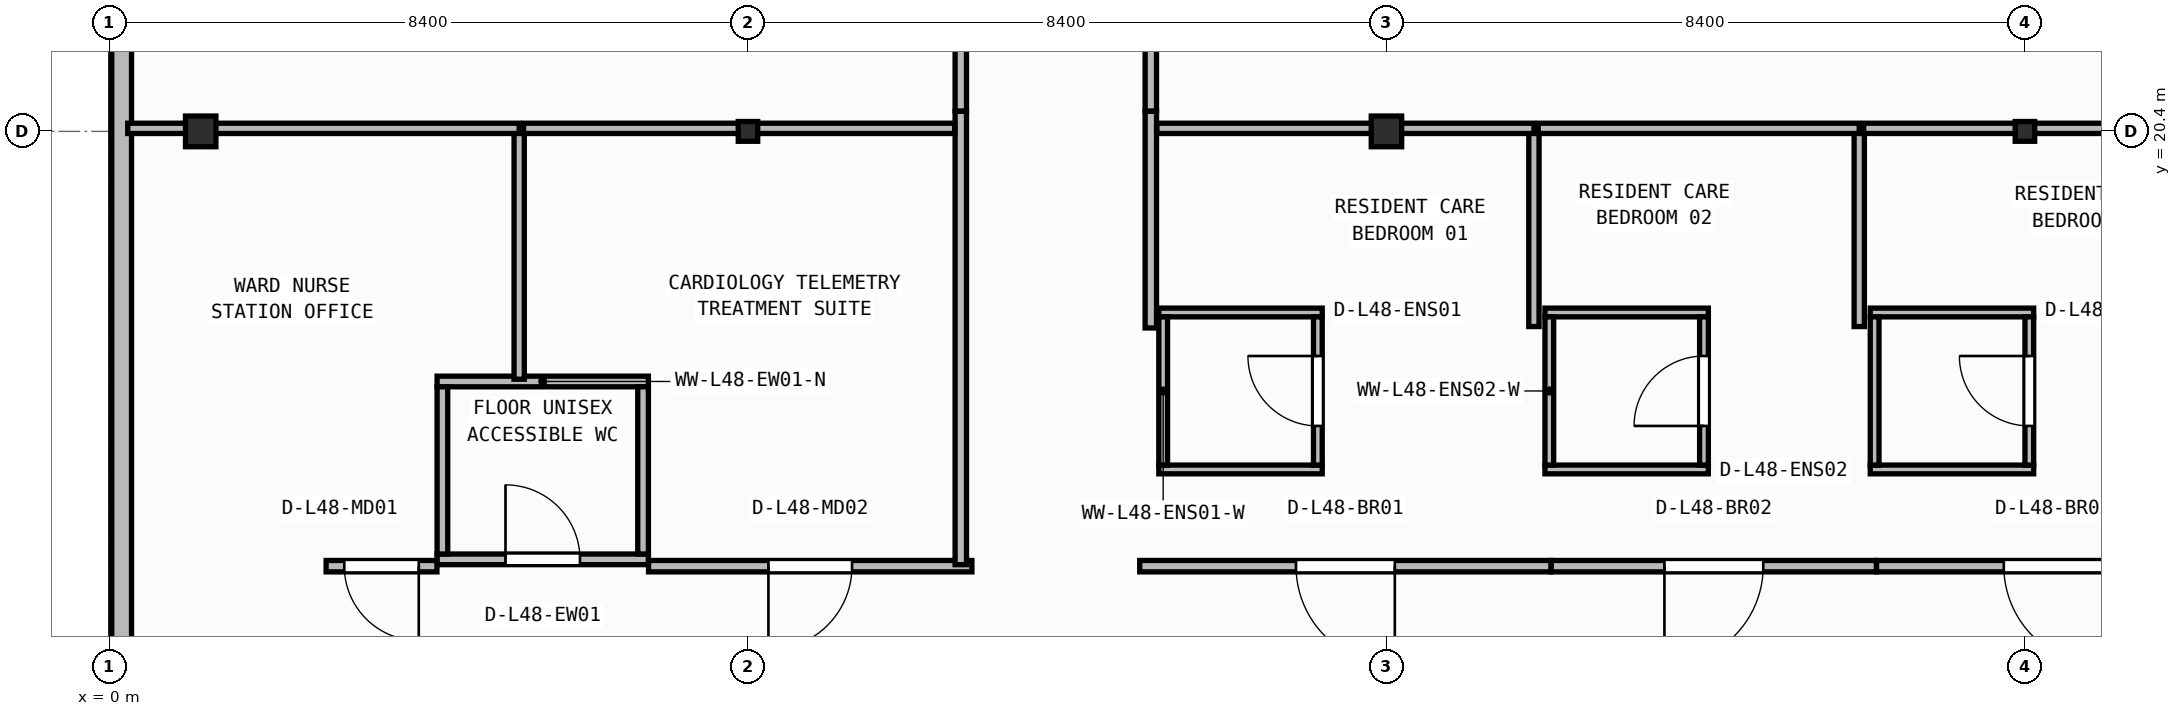
"""IFC4 building model, lengths in metres.
Left out: names, types, materials, properties, quantities, classifications, styles, units other than length and angle.
Written with IfcOpenShell. Run it as: python <this file> out.ifc"""

import sys

from ifc_helpers import new_model, si_unit, direction, frame, frame_2d, origin, origin_2d, place, context, subcontext, project, spatial, rectangle, i_section, extrude, element, fill, save


model = new_model("IFC4")
c1 = context("Model", 3, precision=1e-05, world=origin(), true_north=direction((0.0, 1.0)))
c2 = subcontext(c1, "Body", "Model", "MODEL_VIEW")
j1 = project(units=[si_unit("LENGTHUNIT", "METRE"), si_unit("PLANEANGLEUNIT", "RADIAN")], contexts=[c1])
p1 = place(None, origin())
s1 = spatial("IfcSite", under=j1, at=p1, CompositionType="ELEMENT")
p2 = place(p1, origin())
s2 = spatial("IfcBuilding", under=s1, at=p2, CompositionType="ELEMENT")
p3 = place(p2, frame((0.0, 0.0, 196.05)))
s3 = spatial("IfcBuildingStorey", under=s2, at=p3, CompositionType="ELEMENT", Elevation=196.05)
p4 = place(p3, frame((1.2, 20.4, 0.0), z_axis=(0.0, 0.0, 1.0), x_axis=(1.0, 0.0, 0.0)))
e1 = element("IfcColumn", 1, at=p4, inside=s3, PredefinedType="COLUMN", context=c2, shape_type="SweptSolid", body=[
    extrude(i_section(OverallWidth=0.4, OverallDepth=0.404, WebThickness=0.02, FlangeThickness=0.032, at=origin_2d()), origin(), (0.0, 0.0, 1.0), 3.95),
])
p5 = place(p3, frame((8.4, 20.4, 0.0), z_axis=(0.0, 0.0, 1.0), x_axis=(1.0, 0.0, 0.0)))
e2 = element("IfcColumn", 2, at=p5, inside=s3, PredefinedType="COLUMN", context=c2, shape_type="SweptSolid", body=[
    extrude(i_section(OverallWidth=0.256, OverallDepth=0.26, WebThickness=0.01, FlangeThickness=0.017, FilletRadius=0.013, at=origin_2d()), origin(), (0.0, 0.0, 1.0), 3.95),
])
p6 = place(p3, frame((16.8, 20.4, 0.0), z_axis=(0.0, 0.0, 1.0), x_axis=(1.0, 0.0, 0.0)))
e3 = element("IfcColumn", 3, at=p6, inside=s3, PredefinedType="COLUMN", context=c2, shape_type="SweptSolid", body=[
    extrude(i_section(OverallWidth=0.4, OverallDepth=0.404, WebThickness=0.02, FlangeThickness=0.032, at=origin_2d()), origin(), (0.0, 0.0, 1.0), 3.95),
])
p7 = place(p3, frame((25.2, 20.4, 0.0), z_axis=(0.0, 0.0, 1.0), x_axis=(1.0, 0.0, 0.0)))
e4 = element("IfcColumn", 4, at=p7, inside=s3, PredefinedType="COLUMN", context=c2, shape_type="SweptSolid", body=[
    extrude(i_section(OverallWidth=0.256, OverallDepth=0.26, WebThickness=0.01, FlangeThickness=0.017, FilletRadius=0.013, at=origin_2d()), origin(), (0.0, 0.0, 1.0), 3.95),
])
p8 = place(p3, frame((0.16, 40.14, 0.0), z_axis=(0.0, 0.0, 1.0), x_axis=(0.0, -1.0, 0.0)))
e5 = element("IfcWall", 5, at=p8, inside=s3, PredefinedType="STANDARD", context=c2, shape_type="SweptSolid", body=[
    extrude(rectangle(XDim=37.48, YDim=0.26, at=frame_2d((18.74, 0.0))), origin(), (0.0, 0.0, 1.0), 3.71),
])
p9 = place(p8, frame((27.4, 0.0, 0.9)))
e6 = element("IfcOpeningElement", 6, at=p9, cuts=e5, PredefinedType="OPENING", context=c2, shape_type="SweptSolid", body=[
    extrude(rectangle(XDim=2.4, YDim=1.65, at=frame_2d((1.2, 0.825))), frame((0.0, 0.14, 0.0), z_axis=(0.0, -1.0, 0.0), x_axis=(1.0, 0.0, 0.0)), (0.0, 0.0, 1.0), 0.28),
])
p10 = place(p3, frame((4.31, 14.77, 0.0), z_axis=(0.0, 0.0, 1.0), x_axis=(1.0, 0.0, 0.0)))
e7 = element("IfcWall", 7, at=p10, inside=s3, PredefinedType="PARTITIONING", context=c2, shape_type="SweptSolid", body=[
    extrude(rectangle(XDim=2.78, YDim=0.14, at=frame_2d((1.39, 0.0))), origin(), (0.0, 0.0, 1.0), 3.71),
])
p11 = place(p10, frame((0.9, 0.0, 0.0)))
e8 = element("IfcOpeningElement", 8, at=p11, cuts=e7, PredefinedType="OPENING", context=c2, shape_type="SweptSolid", body=[
    extrude(rectangle(XDim=0.98, YDim=2.1, at=frame_2d((0.49, 1.05))), frame((0.0, 0.08, 0.0), z_axis=(0.0, -1.0, 0.0), x_axis=(1.0, 0.0, 0.0)), (0.0, 0.0, 1.0), 0.16),
])
p12 = place(p3, frame((4.31, 17.11, 0.0), z_axis=(0.0, 0.0, 1.0), x_axis=(1.0, 0.0, 0.0)))
e9 = element("IfcWall", 9, at=p12, inside=s3, PredefinedType="PARTITIONING", context=c2, shape_type="SweptSolid", body=[
    extrude(rectangle(XDim=2.78, YDim=0.14, at=frame_2d((1.39, 0.0))), origin(), (0.0, 0.0, 1.0), 3.71),
])
for number, where, z_axis, x_axis in (
    (10, (4.38, 14.84, 0.0), (0.0, 0.0, 1.0), (0.0, 1.0, 0.0)),
    (11, (7.02, 14.84, 0.0), (0.0, 0.0, 1.0), (0.0, 1.0, 0.0)),
):
    element("IfcWall", number, at=place(p3, frame(where, z_axis=z_axis, x_axis=x_axis)), inside=s3, PredefinedType="PARTITIONING", context=c2, shape_type="SweptSolid", body=[
        extrude(rectangle(XDim=2.2, YDim=0.14, at=frame_2d((1.1, 0.0))), origin(), (0.0, 0.0, 1.0), 3.71),
    ])
for number, where, z_axis, x_axis in (
    (12, (13.805, 15.952, 0.0), (0.0, 0.0, 1.0), (1.0, 0.0, 0.0)),
    (13, (13.805, 18.018, 0.0), (0.0, 0.0, 1.0), (1.0, 0.0, 0.0)),
):
    element("IfcWall", number, at=place(p3, frame(where, z_axis=z_axis, x_axis=x_axis)), inside=s3, PredefinedType="PARTITIONING", context=c2, shape_type="SweptSolid", body=[
        extrude(rectangle(XDim=2.15, YDim=0.115, at=frame_2d((1.075, 0.0))), origin(), (0.0, 0.0, 1.0), 3.71),
    ])
p13 = place(p3, frame((13.863, 16.01, 0.0), z_axis=(0.0, 0.0, 1.0), x_axis=(0.0, 1.0, 0.0)))
e14 = element("IfcWall", 14, at=p13, inside=s3, PredefinedType="PARTITIONING", context=c2, shape_type="SweptSolid", body=[
    extrude(rectangle(XDim=1.95, YDim=0.115, at=frame_2d((0.975, 0.0))), origin(), (0.0, 0.0, 1.0), 3.71),
])
p14 = place(p3, frame((15.897, 16.01, 0.0), z_axis=(0.0, 0.0, 1.0), x_axis=(0.0, 1.0, 0.0)))
e15 = element("IfcWall", 15, at=p14, inside=s3, PredefinedType="PARTITIONING", context=c2, shape_type="SweptSolid", body=[
    extrude(rectangle(XDim=1.95, YDim=0.115, at=frame_2d((0.975, 0.0))), origin(), (0.0, 0.0, 1.0), 3.71),
])
p15 = place(p14, frame((0.515, 0.0, 0.0)))
e16 = element("IfcOpeningElement", 16, at=p15, cuts=e15, PredefinedType="OPENING", context=c2, shape_type="SweptSolid", body=[
    extrude(rectangle(XDim=0.92, YDim=2.1, at=frame_2d((0.46, 1.05))), frame((0.0, 0.067, 0.0), z_axis=(0.0, -1.0, 0.0), x_axis=(1.0, 0.0, 0.0)), (0.0, 0.0, 1.0), 0.135),
])
for number, where, z_axis, x_axis in (
    (17, (18.885, 15.952, 0.0), (0.0, 0.0, 1.0), (1.0, 0.0, 0.0)),
    (18, (18.885, 18.018, 0.0), (0.0, 0.0, 1.0), (1.0, 0.0, 0.0)),
):
    element("IfcWall", number, at=place(p3, frame(where, z_axis=z_axis, x_axis=x_axis)), inside=s3, PredefinedType="PARTITIONING", context=c2, shape_type="SweptSolid", body=[
        extrude(rectangle(XDim=2.15, YDim=0.115, at=frame_2d((1.075, 0.0))), origin(), (0.0, 0.0, 1.0), 3.71),
    ])
p16 = place(p3, frame((18.942, 16.01, 0.0), z_axis=(0.0, 0.0, 1.0), x_axis=(0.0, 1.0, 0.0)))
e19 = element("IfcWall", 19, at=p16, inside=s3, PredefinedType="PARTITIONING", context=c2, shape_type="SweptSolid", body=[
    extrude(rectangle(XDim=1.95, YDim=0.115, at=frame_2d((0.975, 0.0))), origin(), (0.0, 0.0, 1.0), 3.71),
])
p17 = place(p3, frame((20.978, 16.01, 0.0), z_axis=(0.0, 0.0, 1.0), x_axis=(0.0, 1.0, 0.0)))
e20 = element("IfcWall", 20, at=p17, inside=s3, PredefinedType="PARTITIONING", context=c2, shape_type="SweptSolid", body=[
    extrude(rectangle(XDim=1.95, YDim=0.115, at=frame_2d((0.975, 0.0))), origin(), (0.0, 0.0, 1.0), 3.71),
])
p18 = place(p17, frame((0.515, 0.0, 0.0)))
e21 = element("IfcOpeningElement", 21, at=p18, cuts=e20, PredefinedType="OPENING", context=c2, shape_type="SweptSolid", body=[
    extrude(rectangle(XDim=0.92, YDim=2.1, at=frame_2d((0.46, 1.05))), frame((0.0, 0.067, 0.0), z_axis=(0.0, -1.0, 0.0), x_axis=(1.0, 0.0, 0.0)), (0.0, 0.0, 1.0), 0.135),
])
p19 = place(p3, frame((23.165, 15.952, 0.0), z_axis=(0.0, 0.0, 1.0), x_axis=(1.0, 0.0, 0.0)))
e22 = element("IfcWall", 22, at=p19, inside=s3, PredefinedType="PARTITIONING", context=c2, shape_type="SweptSolid", body=[
    extrude(rectangle(XDim=2.15, YDim=0.115, at=frame_2d((1.075, 0.0))), origin(), (0.0, 0.0, 1.0), 3.478),
])
p20 = place(p3, frame((23.165, 18.018, 0.0), z_axis=(0.0, 0.0, 1.0), x_axis=(1.0, 0.0, 0.0)))
e23 = element("IfcWall", 23, at=p20, inside=s3, PredefinedType="PARTITIONING", context=c2, shape_type="SweptSolid", body=[
    extrude(rectangle(XDim=2.15, YDim=0.115, at=frame_2d((1.075, 0.0))), origin(), (0.0, 0.0, 1.0), 3.71),
])
p21 = place(p3, frame((23.222, 16.01, 0.0), z_axis=(0.0, 0.0, 1.0), x_axis=(0.0, 1.0, 0.0)))
e24 = element("IfcWall", 24, at=p21, inside=s3, PredefinedType="PARTITIONING", context=c2, shape_type="SweptSolid", body=[
    extrude(rectangle(XDim=1.95, YDim=0.115, at=frame_2d((0.975, 0.0))), origin(), (0.0, 0.0, 1.0), 3.71),
])
p22 = place(p3, frame((25.258, 16.01, 0.0), z_axis=(0.0, 0.0, 1.0), x_axis=(0.0, 1.0, 0.0)))
e25 = element("IfcWall", 25, at=p22, inside=s3, PredefinedType="PARTITIONING", context=c2, shape_type="SweptSolid", body=[
    extrude(rectangle(XDim=1.95, YDim=0.115, at=frame_2d((0.975, 0.0))), origin(), (0.0, 0.0, 1.0), 3.152),
])
p23 = place(p22, frame((0.515, 0.0, 0.0)))
e26 = element("IfcOpeningElement", 26, at=p23, cuts=e25, PredefinedType="OPENING", context=c2, shape_type="SweptSolid", body=[
    extrude(rectangle(XDim=0.92, YDim=2.1, at=frame_2d((0.46, 1.05))), frame((0.0, 0.067, 0.0), z_axis=(0.0, -1.0, 0.0), x_axis=(1.0, 0.0, 0.0)), (0.0, 0.0, 1.0), 0.135),
])
p24 = place(p3, frame((4.308, 14.68, 0.0), z_axis=(0.0, 0.0, 1.0), x_axis=(-1.0, 0.0, 0.0)))
e27 = element("IfcWall", 27, at=p24, inside=s3, PredefinedType="PARTITIONING", context=c2, shape_type="SweptSolid", body=[
    extrude(rectangle(XDim=1.458, YDim=0.15, at=frame_2d((0.729, 0.0))), origin(), (0.0, 0.0, 1.0), 3.71),
])
p25 = place(p24, frame((0.239, 0.0, 0.0)))
e28 = element("IfcOpeningElement", 28, at=p25, cuts=e27, PredefinedType="OPENING", context=c2, shape_type="SweptSolid", body=[
    extrude(rectangle(XDim=0.98, YDim=2.1, at=frame_2d((0.49, 1.05))), frame((0.0, 0.085, 0.0), z_axis=(0.0, -1.0, 0.0), x_axis=(1.0, 0.0, 0.0)), (0.0, 0.0, 1.0), 0.17),
])
p26 = place(p3, frame((11.346, 14.68, 0.0), z_axis=(0.0, 0.0, 1.0), x_axis=(-1.0, 0.0, 0.0)))
e29 = element("IfcWall", 29, at=p26, inside=s3, PredefinedType="PARTITIONING", context=c2, shape_type="SweptSolid", body=[
    extrude(rectangle(XDim=4.254, YDim=0.15, at=frame_2d((2.127, 0.0))), origin(), (0.0, 0.0, 1.0), 3.71),
])
p27 = place(p26, frame((1.577, 0.0, 0.0)))
e30 = element("IfcOpeningElement", 30, at=p27, cuts=e29, PredefinedType="OPENING", context=c2, shape_type="SweptSolid", body=[
    extrude(rectangle(XDim=1.1, YDim=2.1, at=frame_2d((0.55, 1.05))), frame((0.0, 0.085, 0.0), z_axis=(0.0, -1.0, 0.0), x_axis=(1.0, 0.0, 0.0)), (0.0, 0.0, 1.0), 0.17),
])
p28 = place(p3, frame((18.966, 14.68, 0.0), z_axis=(0.0, 0.0, 1.0), x_axis=(-1.0, 0.0, 0.0)))
e31 = element("IfcWall", 31, at=p28, inside=s3, PredefinedType="PARTITIONING", context=c2, shape_type="SweptSolid", body=[
    extrude(rectangle(XDim=5.412, YDim=0.15, at=frame_2d((2.706, 0.0))), origin(), (0.0, 0.0, 1.0), 3.71),
])
p29 = place(p28, frame((2.056, 0.0, 0.0)))
e32 = element("IfcOpeningElement", 32, at=p29, cuts=e31, PredefinedType="OPENING", context=c2, shape_type="SweptSolid", body=[
    extrude(rectangle(XDim=1.3, YDim=2.15, at=frame_2d((0.65, 1.075))), frame((0.0, 0.085, 0.0), z_axis=(0.0, -1.0, 0.0), x_axis=(1.0, 0.0, 0.0)), (0.0, 0.0, 1.0), 0.17),
])
p30 = place(p3, frame((23.246, 14.68, 0.0), z_axis=(0.0, 0.0, 1.0), x_axis=(-1.0, 0.0, 0.0)))
e33 = element("IfcWall", 33, at=p30, inside=s3, PredefinedType="PARTITIONING", context=c2, shape_type="SweptSolid", body=[
    extrude(rectangle(XDim=4.278, YDim=0.15, at=frame_2d((2.139, 0.0))), origin(), (0.0, 0.0, 1.0), 3.71),
])
p31 = place(p30, frame((1.489, 0.0, 0.0)))
e34 = element("IfcOpeningElement", 34, at=p31, cuts=e33, PredefinedType="OPENING", context=c2, shape_type="SweptSolid", body=[
    extrude(rectangle(XDim=1.3, YDim=2.15, at=frame_2d((0.65, 1.075))), frame((0.0, 0.085, 0.0), z_axis=(0.0, -1.0, 0.0), x_axis=(1.0, 0.0, 0.0)), (0.0, 0.0, 1.0), 0.17),
])
p32 = place(p3, frame((27.896, 14.68, 0.0), z_axis=(0.0, 0.0, 1.0), x_axis=(-1.0, 0.0, 0.0)))
e35 = element("IfcWall", 35, at=p32, inside=s3, PredefinedType="PARTITIONING", context=c2, shape_type="SweptSolid", body=[
    extrude(rectangle(XDim=4.648, YDim=0.15, at=frame_2d((2.324, 0.0))), origin(), (0.0, 0.0, 1.0), 3.71),
])
p33 = place(p32, frame((1.674, 0.0, 0.0)))
e36 = element("IfcOpeningElement", 36, at=p33, cuts=e35, PredefinedType="OPENING", context=c2, shape_type="SweptSolid", body=[
    extrude(rectangle(XDim=1.3, YDim=2.15, at=frame_2d((0.65, 1.075))), frame((0.0, 0.085, 0.0), z_axis=(0.0, -1.0, 0.0), x_axis=(1.0, 0.0, 0.0)), (0.0, 0.0, 1.0), 0.17),
])
p34 = place(p3, frame((11.2, 20.666, 0.0), z_axis=(0.0, 0.0, 1.0), x_axis=(0.0, -1.0, 0.0)))
e37 = element("IfcWall", 37, at=p34, inside=s3, PredefinedType="PARTITIONING", context=c2, shape_type="SweptSolid", body=[
    extrude(rectangle(XDim=5.966, YDim=0.15, at=frame_2d((2.983, 0.0))), origin(), (0.0, 0.0, 1.0), 3.71),
])
p35 = place(p3, frame((13.7, 17.814, 0.0), z_axis=(0.0, 0.0, 1.0), x_axis=(0.0, 1.0, 0.0)))
e38 = element("IfcWall", 38, at=p35, inside=s3, PredefinedType="PARTITIONING", context=c2, shape_type="SweptSolid", body=[
    extrude(rectangle(XDim=2.852, YDim=0.15, at=frame_2d((1.426, 0.0))), origin(), (0.0, 0.0, 1.0), 3.71),
])
p36 = place(p3, frame((11.2, 27.26, 0.0), z_axis=(0.0, 0.0, 1.0), x_axis=(0.0, -1.0, 0.0)))
e39 = element("IfcWall", 39, at=p36, inside=s3, PredefinedType="PARTITIONING", context=c2, shape_type="SweptSolid", body=[
    extrude(rectangle(XDim=6.592, YDim=0.15, at=frame_2d((3.296, 0.0))), origin(), (0.0, 0.0, 1.0), 3.71),
])
p37 = place(p36, frame((2.746, 0.0, 0.0)))
e40 = element("IfcOpeningElement", 40, at=p37, cuts=e39, PredefinedType="OPENING", context=c2, shape_type="SweptSolid", body=[
    extrude(rectangle(XDim=1.1, YDim=2.1, at=frame_2d((0.55, 1.05))), frame((0.0, 0.085, 0.0), z_axis=(0.0, -1.0, 0.0), x_axis=(1.0, 0.0, 0.0)), (0.0, 0.0, 1.0), 0.17),
])
p38 = place(p3, frame((13.7, 20.668, 0.0), z_axis=(0.0, 0.0, 1.0), x_axis=(0.0, 1.0, 0.0)))
e41 = element("IfcWall", 41, at=p38, inside=s3, PredefinedType="PARTITIONING", context=c2, shape_type="SweptSolid", body=[
    extrude(rectangle(XDim=6.592, YDim=0.15, at=frame_2d((3.296, 0.0))), origin(), (0.0, 0.0, 1.0), 3.71),
])
p39 = place(p38, frame((2.746, 0.0, 0.0)))
e42 = element("IfcOpeningElement", 42, at=p39, cuts=e41, PredefinedType="OPENING", context=c2, shape_type="SweptSolid", body=[
    extrude(rectangle(XDim=1.1, YDim=2.1, at=frame_2d((0.55, 1.05))), frame((0.0, 0.085, 0.0), z_axis=(0.0, -1.0, 0.0), x_axis=(1.0, 0.0, 0.0)), (0.0, 0.0, 1.0), 0.17),
])
p40 = place(p3, frame((5.39, 17.14, 0.0), z_axis=(0.0, 0.0, 1.0), x_axis=(0.0, 1.0, 0.0)))
e43 = element("IfcWall", 43, at=p40, inside=s3, PredefinedType="PARTITIONING", context=c2, shape_type="SweptSolid", body=[
    extrude(rectangle(XDim=3.3, YDim=0.135, at=frame_2d((1.65, 0.0))), origin(), (0.0, 0.0, 1.0), 3.71),
])
p41 = place(p3, frame((5.39, 20.44, 0.0), z_axis=(0.0, 0.0, 1.0), x_axis=(-1.0, 0.0, 0.0)))
e44 = element("IfcWall", 44, at=p41, inside=s3, PredefinedType="PARTITIONING", context=c2, shape_type="SweptSolid", body=[
    extrude(rectangle(XDim=5.15, YDim=0.135, at=frame_2d((2.575, 0.0))), origin(), (0.0, 0.0, 1.0), 3.152),
])
p42 = place(p3, frame((11.12, 20.44, 0.0), z_axis=(0.0, 0.0, 1.0), x_axis=(-1.0, 0.0, 0.0)))
e45 = element("IfcWall", 45, at=p42, inside=s3, PredefinedType="PARTITIONING", context=c2, shape_type="SweptSolid", body=[
    extrude(rectangle(XDim=5.673, YDim=0.135, at=frame_2d((2.836, 0.0))), origin(), (0.0, 0.0, 1.0), 3.152),
])
p43 = place(p3, frame((18.74, 17.833, 0.0), z_axis=(0.0, 0.0, 1.0), x_axis=(0.0, 1.0, 0.0)))
e46 = element("IfcWall", 46, at=p43, inside=s3, PredefinedType="PARTITIONING", context=c2, shape_type="SweptSolid", body=[
    extrude(rectangle(XDim=2.607, YDim=0.135, at=frame_2d((1.304, 0.0))), origin(), (0.0, 0.0, 1.0), 3.71),
])
p44 = place(p3, frame((18.74, 20.44, 0.0), z_axis=(0.0, 0.0, 1.0), x_axis=(-1.0, 0.0, 0.0)))
e47 = element("IfcWall", 47, at=p44, inside=s3, PredefinedType="PARTITIONING", context=c2, shape_type="SweptSolid", body=[
    extrude(rectangle(XDim=4.96, YDim=0.135, at=frame_2d((2.48, 0.0))), origin(), (0.0, 0.0, 1.0), 3.152),
])
p45 = place(p3, frame((23.02, 17.833, 0.0), z_axis=(0.0, 0.0, 1.0), x_axis=(0.0, 1.0, 0.0)))
e48 = element("IfcWall", 48, at=p45, inside=s3, PredefinedType="PARTITIONING", context=c2, shape_type="SweptSolid", body=[
    extrude(rectangle(XDim=2.607, YDim=0.135, at=frame_2d((1.304, 0.0))), origin(), (0.0, 0.0, 1.0), 3.71),
])
p46 = place(p3, frame((23.02, 20.44, 0.0), z_axis=(0.0, 0.0, 1.0), x_axis=(-1.0, 0.0, 0.0)))
e49 = element("IfcWall", 49, at=p46, inside=s3, PredefinedType="PARTITIONING", context=c2, shape_type="SweptSolid", body=[
    extrude(rectangle(XDim=4.222, YDim=0.135, at=frame_2d((2.111, 0.0))), origin(), (0.0, 0.0, 1.0), 3.152),
])
p47 = place(p3, frame((27.67, 20.44, 0.0), z_axis=(0.0, 0.0, 1.0), x_axis=(-1.0, 0.0, 0.0)))
e50 = element("IfcWall", 50, at=p47, inside=s3, PredefinedType="PARTITIONING", context=c2, shape_type="SweptSolid", body=[
    extrude(rectangle(XDim=4.593, YDim=0.135, at=frame_2d((2.296, 0.0))), origin(), (0.0, 0.0, 1.0), 3.152),
])
p48 = place(p11, origin())
e51 = element("IfcDoor", 51, at=p48, inside=s3, OperationType="SINGLE_SWING_LEFT", PredefinedType="DOOR", context=c2, shape_type="SweptSolid", body=[
    extrude(rectangle(XDim=0.98, YDim=2.1, at=frame_2d((0.49, 1.05))), frame((0.0, 0.025, 0.0), z_axis=(0.0, -1.0, 0.0), x_axis=(1.0, 0.0, 0.0)), (0.0, 0.0, 1.0), 0.05),
])
fill(e8, e51)
p49 = place(p15, origin())
e52 = element("IfcDoor", 52, at=p49, inside=s3, OperationType="SINGLE_SWING_RIGHT", PredefinedType="DOOR", context=c2, shape_type="SweptSolid", body=[
    extrude(rectangle(XDim=0.92, YDim=2.1, at=frame_2d((0.46, 1.05))), frame((0.0, 0.025, 0.0), z_axis=(0.0, -1.0, 0.0), x_axis=(1.0, 0.0, 0.0)), (0.0, 0.0, 1.0), 0.05),
])
fill(e16, e52)
p50 = place(p18, origin())
e53 = element("IfcDoor", 53, at=p50, inside=s3, OperationType="SINGLE_SWING_LEFT", PredefinedType="DOOR", context=c2, shape_type="SweptSolid", body=[
    extrude(rectangle(XDim=0.92, YDim=2.1, at=frame_2d((0.46, 1.05))), frame((0.0, 0.025, 0.0), z_axis=(0.0, -1.0, 0.0), x_axis=(1.0, 0.0, 0.0)), (0.0, 0.0, 1.0), 0.05),
])
fill(e21, e53)
p51 = place(p23, origin())
e54 = element("IfcDoor", 54, at=p51, inside=s3, OperationType="SINGLE_SWING_RIGHT", PredefinedType="DOOR", context=c2, shape_type="SweptSolid", body=[
    extrude(rectangle(XDim=0.92, YDim=2.1, at=frame_2d((0.46, 1.05))), frame((0.0, 0.025, 0.0), z_axis=(0.0, -1.0, 0.0), x_axis=(1.0, 0.0, 0.0)), (0.0, 0.0, 1.0), 0.05),
])
fill(e26, e54)
p52 = place(p25, origin())
e55 = element("IfcDoor", 55, at=p52, inside=s3, OperationType="SINGLE_SWING_LEFT", PredefinedType="DOOR", context=c2, shape_type="SweptSolid", body=[
    extrude(rectangle(XDim=0.98, YDim=2.1, at=frame_2d((0.49, 1.05))), frame((0.0, 0.025, 0.0), z_axis=(0.0, -1.0, 0.0), x_axis=(1.0, 0.0, 0.0)), (0.0, 0.0, 1.0), 0.05),
])
fill(e28, e55)
p53 = place(p27, origin())
e56 = element("IfcDoor", 56, at=p53, inside=s3, OperationType="SINGLE_SWING_RIGHT", PredefinedType="DOOR", context=c2, shape_type="SweptSolid", body=[
    extrude(rectangle(XDim=1.1, YDim=2.1, at=frame_2d((0.55, 1.05))), frame((0.0, 0.025, 0.0), z_axis=(0.0, -1.0, 0.0), x_axis=(1.0, 0.0, 0.0)), (0.0, 0.0, 1.0), 0.05),
])
fill(e30, e56)
p54 = place(p29, origin())
e57 = element("IfcDoor", 57, at=p54, inside=s3, OperationType="SINGLE_SWING_LEFT", PredefinedType="DOOR", context=c2, shape_type="SweptSolid", body=[
    extrude(rectangle(XDim=1.3, YDim=2.15, at=frame_2d((0.65, 1.075))), frame((0.0, 0.025, 0.0), z_axis=(0.0, -1.0, 0.0), x_axis=(1.0, 0.0, 0.0)), (0.0, 0.0, 1.0), 0.05),
])
fill(e32, e57)
p55 = place(p31, origin())
e58 = element("IfcDoor", 58, at=p55, inside=s3, OperationType="SINGLE_SWING_RIGHT", PredefinedType="DOOR", context=c2, shape_type="SweptSolid", body=[
    extrude(rectangle(XDim=1.3, YDim=2.15, at=frame_2d((0.65, 1.075))), frame((0.0, 0.025, 0.0), z_axis=(0.0, -1.0, 0.0), x_axis=(1.0, 0.0, 0.0)), (0.0, 0.0, 1.0), 0.05),
])
fill(e34, e58)
p56 = place(p33, origin())
e59 = element("IfcDoor", 59, at=p56, inside=s3, OperationType="SINGLE_SWING_LEFT", PredefinedType="DOOR", context=c2, shape_type="SweptSolid", body=[
    extrude(rectangle(XDim=1.3, YDim=2.15, at=frame_2d((0.65, 1.075))), frame((0.0, 0.025, 0.0), z_axis=(0.0, -1.0, 0.0), x_axis=(1.0, 0.0, 0.0)), (0.0, 0.0, 1.0), 0.05),
])
fill(e36, e59)
save(model, sys.argv[1])
